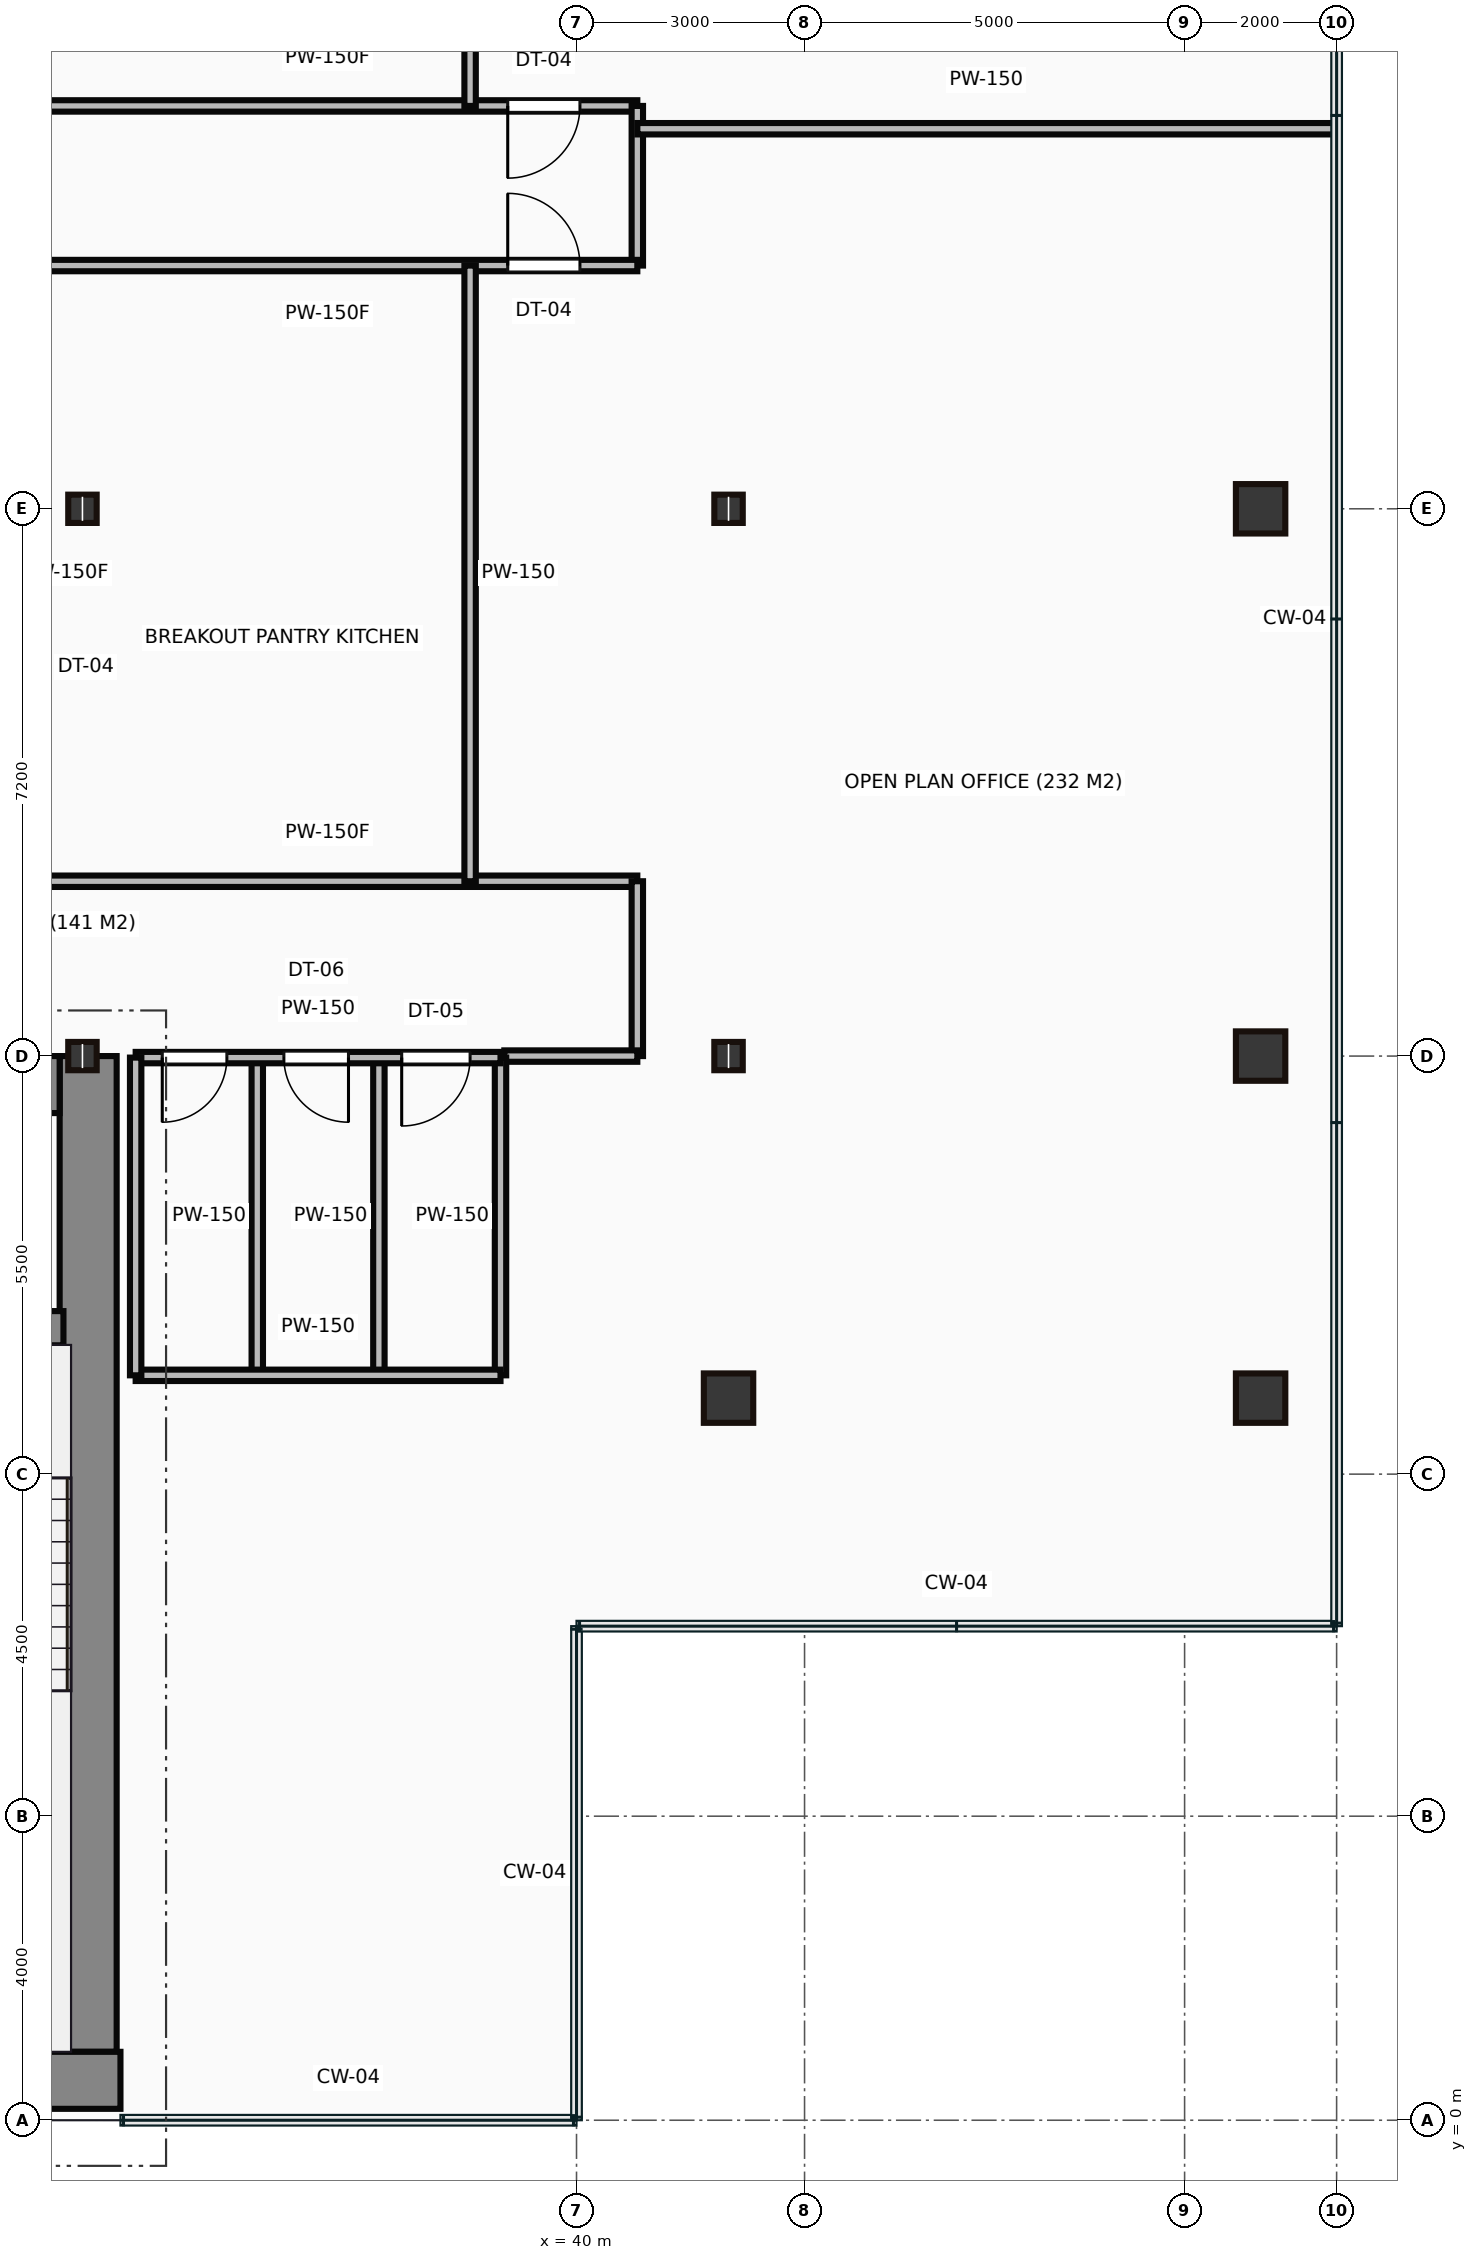
"""IFC4 building model, lengths in metres.
Left out: names, types, materials, properties, quantities, classifications, styles, units other than length and angle.
Written with IfcOpenShell. Run it as: python <this file> out.ifc"""

import sys

from ifc_helpers import new_model, si_unit, direction, frame, frame_2d, origin, origin_2d, place, context, subcontext, project, spatial, rectangle, hollow_rectangle, i_section, extrude, source, transform, mapped, element, fill, save


model = new_model("IFC4")
c1 = context("Model", 3, precision=1e-05, world=origin(), true_north=direction((0.0, 1.0)))
c2 = subcontext(c1, "Body", "Model", "MODEL_VIEW")
j1 = project(units=[si_unit("LENGTHUNIT", "METRE"), si_unit("PLANEANGLEUNIT", "RADIAN")], contexts=[c1])
p1 = place(None, origin())
s1 = spatial("IfcSite", under=j1, at=p1, CompositionType="ELEMENT")
p2 = place(p1, origin())
s2 = spatial("IfcBuilding", under=s1, at=p2, CompositionType="ELEMENT")
p3 = place(p2, frame((0.0, 0.0, 180.75)))
s3 = spatial("IfcBuildingStorey", under=s2, at=p3, CompositionType="ELEMENT", Elevation=180.75)
m1 = source(origin(), c2, "Body", "SweptSolid", [
    extrude(rectangle(XDim=29.5, YDim=0.75, at=frame_2d((14.75, 0.0))), origin(), (0.0, 0.0, 1.0), 3.65),
])
p4 = place(p3, frame((4.5, 0.525, 0.0), z_axis=(0.0, 0.0, 1.0), x_axis=(1.0, 0.0, 0.0)))
e1 = element("IfcWall", 1, at=p4, inside=s3, PredefinedType="SHEAR", context=c2, shape_type="MappedRepresentation", body=[
    mapped(m1, transform((0.0, 0.0, 0.0))),
])
m2 = source(origin(), c2, "Body", "SweptSolid", [
    extrude(rectangle(XDim=13.1, YDim=0.75, at=frame_2d((6.55, 0.0))), origin(), (0.0, 0.0, 1.0), 3.65),
])
p5 = place(p3, frame((33.575, 0.9, 0.0), z_axis=(0.0, 0.0, 1.0), x_axis=(0.0, 1.0, 0.0)))
e2 = element("IfcWall", 2, at=p5, inside=s3, PredefinedType="SHEAR", context=c2, shape_type="MappedRepresentation", body=[
    mapped(m2, transform((0.0, 0.0, 0.0))),
])
m3 = source(origin(), c2, "Body", "SweptSolid", [
    extrude(rectangle(XDim=12.6, YDim=0.75, at=frame_2d((6.3, 0.0))), origin(), (0.0, 0.0, 1.0), 3.65),
])
p6 = place(p3, frame((20.6, 13.625, 0.0), z_axis=(0.0, 0.0, 1.0), x_axis=(1.0, 0.0, 0.0)))
e3 = element("IfcWall", 3, at=p6, inside=s3, PredefinedType="SHEAR", context=c2, shape_type="MappedRepresentation", body=[
    mapped(m3, transform((0.0, 0.0, 0.0))),
])
p7 = place(p6, frame((9.25, 0.0, 0.0)))
e4 = element("IfcOpeningElement", 4, at=p7, cuts=e3, PredefinedType="OPENING", context=c2, shape_type="SweptSolid", body=[
    extrude(rectangle(XDim=1.1, YDim=2.15, at=frame_2d((0.55, 1.075))), frame((0.0, 0.385, 0.0), z_axis=(0.0, -1.0, 0.0), x_axis=(1.0, 0.0, 0.0)), (0.0, 0.0, 1.0), 0.77),
])
m4 = source(origin(), c2, "Body", "SweptSolid", [
    extrude(rectangle(XDim=3.39, YDim=0.45, at=frame_2d((1.695, 0.0))), origin(), (0.0, 0.0, 1.0), 3.65),
])
p8 = place(p3, frame((29.86, 10.42, 0.0), z_axis=(0.0, 0.0, 1.0), x_axis=(1.0, 0.0, 0.0)))
e5 = element("IfcWall", 5, at=p8, inside=s3, PredefinedType="SHEAR", context=c2, shape_type="MappedRepresentation", body=[
    mapped(m4, transform((0.0, 0.0, 0.0))),
])
p9 = place(p8, frame((1.1, 0.0, 0.0)))
e6 = element("IfcOpeningElement", 6, at=p9, cuts=e5, PredefinedType="OPENING", context=c2, shape_type="SweptSolid", body=[
    extrude(rectangle(XDim=1.1, YDim=2.15, at=frame_2d((0.55, 1.075))), frame((0.0, 0.235, 0.0), z_axis=(0.0, -1.0, 0.0), x_axis=(1.0, 0.0, 0.0)), (0.0, 0.0, 1.0), 0.47),
])
m5 = source(origin(), c2, "Body", "SweptSolid", [
    extrude(i_section(OverallWidth=0.374, OverallDepth=0.372, WebThickness=0.016, FlangeThickness=0.026, at=origin_2d()), origin(), (0.0, 0.0, 1.0), 3.65),
])
for number, where, z_axis, x_axis in (
    (7, (33.5, 14.0, 0.0), (0.0, 0.0, 1.0), (1.0, 0.0, 0.0)),
    (8, (33.5, 21.2, 0.0), (0.0, 0.0, 1.0), (1.0, 0.0, 0.0)),
):
    element("IfcColumn", number, at=place(p3, frame(where, z_axis=z_axis, x_axis=x_axis)), inside=s3, PredefinedType="COLUMN", context=c2, shape_type="MappedRepresentation", body=[
        mapped(m5, transform((0.0, 0.0, 0.0))),
    ])
m6 = source(origin(), c2, "Body", "SweptSolid", [
    extrude(hollow_rectangle(XDim=0.65, YDim=0.65, WallThickness=0.032, at=origin_2d()), origin(), (0.0, 0.0, 1.0), 3.65),
])
p10 = place(p3, frame((42.0, 9.5, 0.0), z_axis=(0.0, 0.0, 1.0), x_axis=(1.0, 0.0, 0.0)))
e9 = element("IfcColumn", 9, at=p10, inside=s3, PredefinedType="COLUMN", context=c2, shape_type="MappedRepresentation", body=[
    mapped(m6, transform((0.0, 0.0, 0.0))),
])
for number, where, z_axis, x_axis in (
    (10, (42.0, 14.0, 0.0), (0.0, 0.0, 1.0), (1.0, 0.0, 0.0)),
    (11, (42.0, 21.2, 0.0), (0.0, 0.0, 1.0), (1.0, 0.0, 0.0)),
):
    element("IfcColumn", number, at=place(p3, frame(where, z_axis=z_axis, x_axis=x_axis)), inside=s3, PredefinedType="COLUMN", context=c2, shape_type="MappedRepresentation", body=[
        mapped(m5, transform((0.0, 0.0, 0.0))),
    ])
for number, where, z_axis, x_axis in (
    (12, (49.0, 9.5, 0.0), (0.0, 0.0, 1.0), (1.0, 0.0, 0.0)),
    (13, (49.0, 14.0, 0.0), (0.0, 0.0, 1.0), (1.0, 0.0, 0.0)),
    (14, (49.0, 21.2, 0.0), (0.0, 0.0, 1.0), (1.0, 0.0, 0.0)),
):
    element("IfcColumn", number, at=place(p3, frame(where, z_axis=z_axis, x_axis=x_axis)), inside=s3, PredefinedType="COLUMN", context=c2, shape_type="MappedRepresentation", body=[
        mapped(m6, transform((0.0, 0.0, 0.0))),
    ])
m7 = source(origin(), c2, "Body", "SweptSolid", [
    extrude(rectangle(XDim=4.8, YDim=0.15, at=frame_2d((2.4, 0.0))), origin(), (0.0, 0.0, 1.0), 2.76),
])
p11 = place(p3, frame((34.2, 13.98, 0.0), z_axis=(0.0, 0.0, 1.0), x_axis=(1.0, 0.0, 0.0)))
e15 = element("IfcWall", 15, at=p11, inside=s3, PredefinedType="PARTITIONING", context=c2, shape_type="MappedRepresentation", body=[
    mapped(m7, transform((0.0, 0.0, 0.0))),
])
p12 = place(p11, frame((0.35, 0.0, 0.0)))
e16 = element("IfcOpeningElement", 16, at=p12, cuts=e15, PredefinedType="OPENING", context=c2, shape_type="SweptSolid", body=[
    extrude(rectangle(XDim=0.85, YDim=2.1, at=frame_2d((0.425, 1.05))), frame((0.0, 0.085, 0.0), z_axis=(0.0, -1.0, 0.0), x_axis=(1.0, 0.0, 0.0)), (0.0, 0.0, 1.0), 0.17),
])
p13 = place(p11, frame((1.95, 0.0, 0.0)))
e17 = element("IfcOpeningElement", 17, at=p13, cuts=e15, PredefinedType="OPENING", context=c2, shape_type="SweptSolid", body=[
    extrude(rectangle(XDim=0.85, YDim=2.1, at=frame_2d((0.425, 1.05))), frame((0.0, 0.085, 0.0), z_axis=(0.0, -1.0, 0.0), x_axis=(1.0, 0.0, 0.0)), (0.0, 0.0, 1.0), 0.17),
])
p14 = place(p11, frame((3.5, 0.0, 0.0)))
e18 = element("IfcOpeningElement", 18, at=p14, cuts=e15, PredefinedType="OPENING", context=c2, shape_type="SweptSolid", body=[
    extrude(rectangle(XDim=0.9, YDim=2.1, at=frame_2d((0.45, 1.05))), frame((0.0, 0.085, 0.0), z_axis=(0.0, -1.0, 0.0), x_axis=(1.0, 0.0, 0.0)), (0.0, 0.0, 1.0), 0.17),
])
m8 = source(origin(), c2, "Body", "SweptSolid", [
    extrude(rectangle(XDim=4.8, YDim=0.15, at=frame_2d((2.4, 0.0))), origin(), (0.0, 0.0, 1.0), 3.4),
])
p15 = place(p3, frame((34.2, 9.8, 0.0), z_axis=(0.0, 0.0, 1.0), x_axis=(1.0, 0.0, 0.0)))
e19 = element("IfcWall", 19, at=p15, inside=s3, PredefinedType="PARTITIONING", context=c2, shape_type="MappedRepresentation", body=[
    mapped(m8, transform((0.0, 0.0, 0.0))),
])
m9 = source(origin(), c2, "Body", "SweptSolid", [
    extrude(rectangle(XDim=4.18, YDim=0.15, at=frame_2d((2.09, 0.0))), origin(), (0.0, 0.0, 1.0), 3.4),
])
for number, where, z_axis, x_axis in (
    (20, (39.0, 9.8, 0.0), (0.0, 0.0, 1.0), (0.0, 1.0, 0.0)),
    (21, (34.2, 9.8, 0.0), (0.0, 0.0, 1.0), (0.0, 1.0, 0.0)),
    (22, (35.8, 9.8, 0.0), (0.0, 0.0, 1.0), (0.0, 1.0, 0.0)),
    (23, (37.4, 9.8, 0.0), (0.0, 0.0, 1.0), (0.0, 1.0, 0.0)),
):
    element("IfcWall", number, at=place(p3, frame(where, z_axis=z_axis, x_axis=x_axis)), inside=s3, PredefinedType="PARTITIONING", context=c2, shape_type="MappedRepresentation", body=[
        mapped(m9, transform((0.0, 0.0, 0.0))),
    ])
m10 = source(origin(), c2, "Body", "SweptSolid", [
    extrude(rectangle(XDim=8.15, YDim=0.15, at=frame_2d((4.075, 0.0))), origin(), (0.0, 0.0, 1.0), 3.4),
])
p16 = place(p3, frame((32.65, 26.5, 0.0), z_axis=(0.0, 0.0, 1.0), x_axis=(1.0, 0.0, 0.0)))
e24 = element("IfcWall", 24, at=p16, inside=s3, PredefinedType="PARTITIONING", context=c2, shape_type="MappedRepresentation", body=[
    mapped(m10, transform((0.0, 0.0, 0.0))),
])
p17 = place(p16, frame((6.445, 0.0, 0.0)))
e25 = element("IfcOpeningElement", 25, at=p17, cuts=e24, PredefinedType="OPENING", context=c2, shape_type="SweptSolid", body=[
    extrude(rectangle(XDim=0.95, YDim=2.15, at=frame_2d((0.475, 1.075))), frame((0.0, 0.085, 0.0), z_axis=(0.0, -1.0, 0.0), x_axis=(1.0, 0.0, 0.0)), (0.0, 0.0, 1.0), 0.17),
])
m11 = source(origin(), c2, "Body", "SweptSolid", [
    extrude(rectangle(XDim=2.1, YDim=0.15, at=frame_2d((1.05, 0.0))), origin(), (0.0, 0.0, 1.0), 3.4),
])
p18 = place(p3, frame((40.8, 26.5, 0.0), z_axis=(0.0, 0.0, 1.0), x_axis=(0.0, -1.0, 0.0)))
e26 = element("IfcWall", 26, at=p18, inside=s3, PredefinedType="PARTITIONING", context=c2, shape_type="MappedRepresentation", body=[
    mapped(m11, transform((0.0, 0.0, 0.0))),
])
p19 = place(p3, frame((40.8, 24.4, 0.0), z_axis=(0.0, 0.0, 1.0), x_axis=(-1.0, 0.0, 0.0)))
e27 = element("IfcWall", 27, at=p19, inside=s3, PredefinedType="PARTITIONING", context=c2, shape_type="MappedRepresentation", body=[
    mapped(m10, transform((0.0, 0.0, 0.0))),
])
p20 = place(p19, frame((0.755, 0.0, 0.0)))
e28 = element("IfcOpeningElement", 28, at=p20, cuts=e27, PredefinedType="OPENING", context=c2, shape_type="SweptSolid", body=[
    extrude(rectangle(XDim=0.95, YDim=2.15, at=frame_2d((0.475, 1.075))), frame((0.0, 0.085, 0.0), z_axis=(0.0, -1.0, 0.0), x_axis=(1.0, 0.0, 0.0)), (0.0, 0.0, 1.0), 0.17),
])
p21 = place(p3, frame((32.65, 16.3, 0.0), z_axis=(0.0, 0.0, 1.0), x_axis=(1.0, 0.0, 0.0)))
e29 = element("IfcWall", 29, at=p21, inside=s3, PredefinedType="PARTITIONING", context=c2, shape_type="MappedRepresentation", body=[
    mapped(m10, transform((0.0, 0.0, 0.0))),
])
m12 = source(origin(), c2, "Body", "SweptSolid", [
    extrude(rectangle(XDim=2.3, YDim=0.15, at=frame_2d((1.15, 0.0))), origin(), (0.0, 0.0, 1.0), 3.4),
])
p22 = place(p3, frame((40.8, 16.3, 0.0), z_axis=(0.0, 0.0, 1.0), x_axis=(0.0, -1.0, 0.0)))
e30 = element("IfcWall", 30, at=p22, inside=s3, PredefinedType="PARTITIONING", context=c2, shape_type="MappedRepresentation", body=[
    mapped(m12, transform((0.0, 0.0, 0.0))),
])
m13 = source(origin(), c2, "Body", "SweptSolid", [
    extrude(rectangle(XDim=1.75, YDim=0.15, at=frame_2d((0.875, 0.0))), origin(), (0.0, 0.0, 1.0), 2.76),
])
p23 = place(p3, frame((40.8, 14.0, 0.0), z_axis=(0.0, 0.0, 1.0), x_axis=(-1.0, 0.0, 0.0)))
e31 = element("IfcWall", 31, at=p23, inside=s3, PredefinedType="PARTITIONING", context=c2, shape_type="MappedRepresentation", body=[
    mapped(m13, transform((0.0, 0.0, 0.0))),
])
m14 = source(origin(), c2, "Body", "SweptSolid", [
    extrude(rectangle(XDim=8.1, YDim=0.15, at=frame_2d((4.05, 0.0))), origin(), (0.0, 0.0, 1.0), 3.4),
])
p24 = place(p3, frame((38.6, 24.4, 0.0), z_axis=(0.0, 0.0, 1.0), x_axis=(0.0, -1.0, 0.0)))
e32 = element("IfcWall", 32, at=p24, inside=s3, PredefinedType="PARTITIONING", context=c2, shape_type="MappedRepresentation", body=[
    mapped(m14, transform((0.0, 0.0, 0.0))),
])
m15 = source(origin(), c2, "Body", "SweptSolid", [
    extrude(rectangle(XDim=7.3, YDim=0.15, at=frame_2d((3.65, 0.0))), origin(), (0.0, 0.0, 1.0), 3.4),
])
p25 = place(p3, frame((38.6, 33.8, 0.0), z_axis=(0.0, 0.0, 1.0), x_axis=(0.0, -1.0, 0.0)))
e33 = element("IfcWall", 33, at=p25, inside=s3, PredefinedType="PARTITIONING", context=c2, shape_type="MappedRepresentation", body=[
    mapped(m15, transform((0.0, 0.0, 0.0))),
])
m16 = source(origin(), c2, "Body", "SweptSolid", [
    extrude(rectangle(XDim=9.18, YDim=0.15, at=frame_2d((4.59, 0.0))), origin(), (0.0, 0.0, 1.0), 3.4),
])
p26 = place(p3, frame((40.8, 26.2, 0.0), z_axis=(0.0, 0.0, 1.0), x_axis=(1.0, 0.0, 0.0)))
e34 = element("IfcWall", 34, at=p26, inside=s3, PredefinedType="PARTITIONING", context=c2, shape_type="MappedRepresentation", body=[
    mapped(m16, transform((0.0, 0.0, 0.0))),
])
m17 = source(origin(), c2, "Body", "SweptSolid", [
    extrude(rectangle(XDim=0.85, YDim=2.1, at=frame_2d((0.425, 1.05))), frame((0.0, 0.025, 0.0), z_axis=(0.0, -1.0, 0.0), x_axis=(1.0, 0.0, 0.0)), (0.0, 0.0, 1.0), 0.05),
])
p27 = place(p12, frame((0.85, 0.0, 0.0), z_axis=(0.0, 0.0, 1.0), x_axis=(-1.0, 0.0, 0.0)))
e35 = element("IfcDoor", 35, at=p27, inside=s3, OperationType="SINGLE_SWING_LEFT", PredefinedType="DOOR", context=c2, shape_type="MappedRepresentation", body=[
    mapped(m17, transform((0.0, 0.0, 0.0))),
])
fill(e16, e35)
p28 = place(p13, frame((0.85, 0.0, 0.0), z_axis=(0.0, 0.0, 1.0), x_axis=(-1.0, 0.0, 0.0)))
e36 = element("IfcDoor", 36, at=p28, inside=s3, OperationType="SINGLE_SWING_RIGHT", PredefinedType="DOOR", context=c2, shape_type="MappedRepresentation", body=[
    mapped(m17, transform((0.0, 0.0, 0.0))),
])
fill(e17, e36)
m18 = source(origin(), c2, "Body", "SweptSolid", [
    extrude(rectangle(XDim=0.9, YDim=2.1, at=frame_2d((0.45, 1.05))), frame((0.0, 0.025, 0.0), z_axis=(0.0, -1.0, 0.0), x_axis=(1.0, 0.0, 0.0)), (0.0, 0.0, 1.0), 0.05),
])
p29 = place(p14, frame((0.9, 0.0, 0.0), z_axis=(0.0, 0.0, 1.0), x_axis=(-1.0, 0.0, 0.0)))
e37 = element("IfcDoor", 37, at=p29, inside=s3, OperationType="SINGLE_SWING_LEFT", PredefinedType="DOOR", context=c2, shape_type="MappedRepresentation", body=[
    mapped(m18, transform((0.0, 0.0, 0.0))),
])
fill(e18, e37)
m19 = source(origin(), c2, "Body", "SweptSolid", [
    extrude(rectangle(XDim=0.95, YDim=2.15, at=frame_2d((0.475, 1.075))), frame((0.0, 0.025, 0.0), z_axis=(0.0, -1.0, 0.0), x_axis=(1.0, 0.0, 0.0)), (0.0, 0.0, 1.0), 0.05),
])
p30 = place(p20, origin())
e38 = element("IfcDoor", 38, at=p30, inside=s3, OperationType="SINGLE_SWING_RIGHT", PredefinedType="DOOR", context=c2, shape_type="MappedRepresentation", body=[
    mapped(m19, transform((0.0, 0.0, 0.0))),
])
fill(e28, e38)
p31 = place(p17, origin())
e39 = element("IfcDoor", 39, at=p31, inside=s3, OperationType="SINGLE_SWING_LEFT", PredefinedType="DOOR", context=c2, shape_type="MappedRepresentation", body=[
    mapped(m19, transform((0.0, 0.0, 0.0))),
])
fill(e25, e39)
save(model, sys.argv[1])
